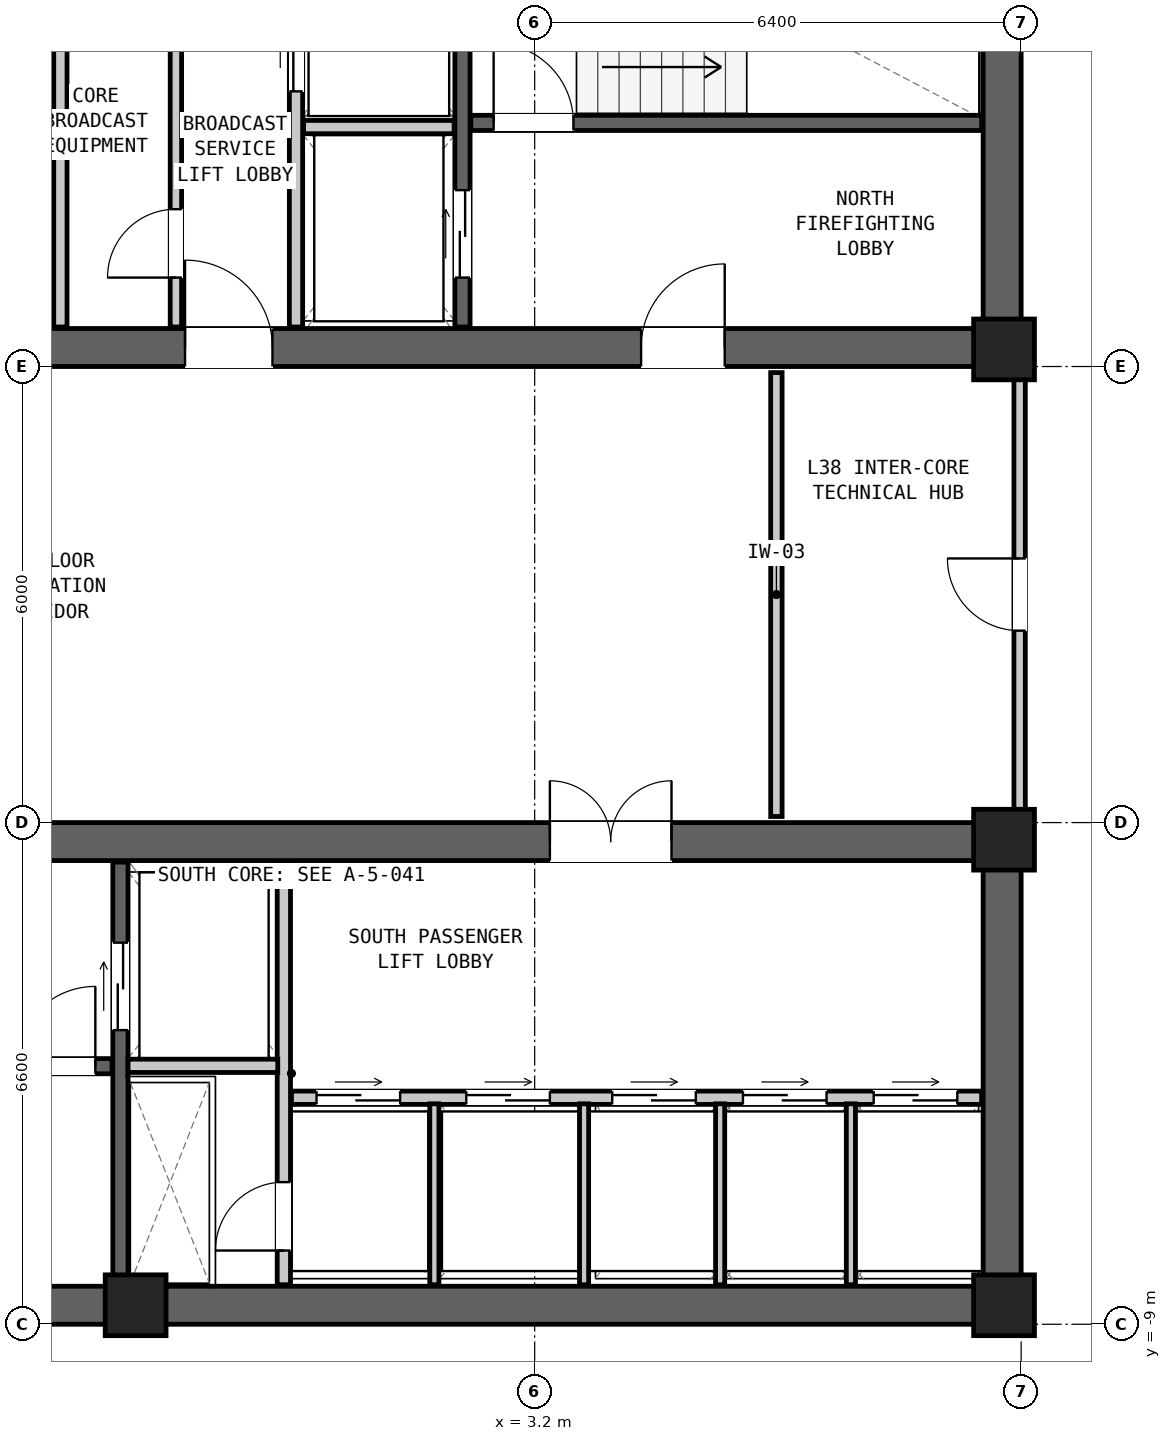
"""IFC4 building model, lengths in metres.
Left out: names, types, materials, properties, quantities, classifications, styles, units other than length and angle.
Written with IfcOpenShell. Run it as: python <this file> out.ifc"""

import sys

from ifc_helpers import new_model, si_unit, direction, frame, frame_2d, origin, origin_2d, place, context, subcontext, project, spatial, rectangle, extrude, element, fill, save


model = new_model("IFC4")
c1 = context("Model", 3, precision=1e-05, world=origin(), true_north=direction((0.0, 1.0)))
c2 = subcontext(c1, "Body", "Model", "MODEL_VIEW")
j1 = project(units=[si_unit("LENGTHUNIT", "METRE"), si_unit("PLANEANGLEUNIT", "RADIAN")], contexts=[c1])
p1 = place(None, origin())
s1 = spatial("IfcSite", under=j1, at=p1, CompositionType="ELEMENT")
p2 = place(p1, origin())
s2 = spatial("IfcBuilding", under=s1, at=p2, CompositionType="ELEMENT")
p3 = place(p2, frame((0.0, 0.0, 131.1)))
s3 = spatial("IfcBuildingStorey", under=s2, at=p3, CompositionType="ELEMENT", Elevation=131.1)
p4 = place(p3, frame((-9.6, 3.85, 0.0), z_axis=(0.0, 0.0, 1.0), x_axis=(1.0, 0.0, 0.0)))
e1 = element("IfcWall", 1, at=p4, inside=s3, PredefinedType="SHEAR", context=c2, shape_type="SweptSolid", body=[
    extrude(rectangle(XDim=19.2, YDim=0.5, at=frame_2d((9.6, 0.0))), origin(), (0.0, 0.0, 1.0), 3.05),
])
p5 = place(p4, frame((14.2, 0.0, 0.0)))
e2 = element("IfcOpeningElement", 2, at=p5, cuts=e1, PredefinedType="OPENING", context=c2, shape_type="SweptSolid", body=[
    extrude(rectangle(XDim=1.1, YDim=2.08, at=frame_2d((0.55, 1.04))), frame((0.0, 0.262, 0.0), z_axis=(0.0, -1.0, 0.0), x_axis=(1.0, 0.0, 0.0)), (0.0, 0.0, 1.0), 0.524),
])
p6 = place(p4, frame((8.2, 0.0, 0.0)))
e3 = element("IfcOpeningElement", 3, at=p6, cuts=e1, PredefinedType="OPENING", context=c2, shape_type="SweptSolid", body=[
    extrude(rectangle(XDim=1.15, YDim=2.1, at=frame_2d((0.575, 1.05))), frame((0.0, 0.262, 0.0), z_axis=(0.0, -1.0, 0.0), x_axis=(1.0, 0.0, 0.0)), (0.0, 0.0, 1.0), 0.524),
])
p7 = place(p4, frame((2.5, 0.0, 0.0)))
e4 = element("IfcOpeningElement", 4, at=p7, cuts=e1, PredefinedType="OPENING", context=c2, shape_type="SweptSolid", body=[
    extrude(rectangle(XDim=1.2, YDim=2.1, at=frame_2d((0.6, 1.05))), frame((0.0, 0.262, 0.0), z_axis=(0.0, -1.0, 0.0), x_axis=(1.0, 0.0, 0.0)), (0.0, 0.0, 1.0), 0.524),
])
p8 = place(p3, frame((9.35, 3.6, 0.0), z_axis=(0.0, 0.0, 1.0), x_axis=(0.0, 1.0, 0.0)))
e5 = element("IfcWall", 5, at=p8, inside=s3, PredefinedType="SHEAR", context=c2, shape_type="SweptSolid", body=[
    extrude(rectangle(XDim=6.6, YDim=0.5, at=frame_2d((3.3, 0.0))), origin(), (0.0, 0.0, 1.0), 3.05),
])
p9 = place(p3, frame((-9.6, -8.75, 0.0), z_axis=(0.0, 0.0, 1.0), x_axis=(1.0, 0.0, 0.0)))
e6 = element("IfcWall", 6, at=p9, inside=s3, PredefinedType="SHEAR", context=c2, shape_type="SweptSolid", body=[
    extrude(rectangle(XDim=19.2, YDim=0.5, at=frame_2d((9.6, 0.0))), origin(), (0.0, 0.0, 1.0), 3.05),
])
p10 = place(p3, frame((-9.6, -2.65, 0.0), z_axis=(0.0, 0.0, 1.0), x_axis=(1.0, 0.0, 0.0)))
e7 = element("IfcWall", 7, at=p10, inside=s3, PredefinedType="SHEAR", context=c2, shape_type="SweptSolid", body=[
    extrude(rectangle(XDim=19.2, YDim=0.5, at=frame_2d((9.6, 0.0))), origin(), (0.0, 0.0, 1.0), 3.05),
])
p11 = place(p10, frame((3.8, 0.0, 0.0)))
e8 = element("IfcOpeningElement", 8, at=p11, cuts=e7, PredefinedType="OPENING", context=c2, shape_type="SweptSolid", body=[
    extrude(rectangle(XDim=1.1, YDim=2.08, at=frame_2d((0.55, 1.04))), frame((0.0, 0.262, 0.0), z_axis=(0.0, -1.0, 0.0), x_axis=(1.0, 0.0, 0.0)), (0.0, 0.0, 1.0), 0.524),
])
p12 = place(p10, frame((13.0, 0.0, 0.0)))
e9 = element("IfcOpeningElement", 9, at=p12, cuts=e7, PredefinedType="OPENING", context=c2, shape_type="SweptSolid", body=[
    extrude(rectangle(XDim=1.6, YDim=2.12, at=frame_2d((0.8, 1.06))), frame((0.0, 0.262, 0.0), z_axis=(0.0, -1.0, 0.0), x_axis=(1.0, 0.0, 0.0)), (0.0, 0.0, 1.0), 0.524),
])
p13 = place(p3, frame((9.35, -9.0, 0.0), z_axis=(0.0, 0.0, 1.0), x_axis=(0.0, 1.0, 0.0)))
e10 = element("IfcWall", 10, at=p13, inside=s3, PredefinedType="SHEAR", context=c2, shape_type="SweptSolid", body=[
    extrude(rectangle(XDim=6.6, YDim=0.5, at=frame_2d((3.3, 0.0))), origin(), (0.0, 0.0, 1.0), 3.05),
])
for number, where, z_axis, x_axis in (
    (11, (9.375, 3.825, 0.0), (0.0, 0.0, 1.0), (1.0, 0.0, 0.0)),
    (12, (9.375, -2.625, 0.0), (0.0, 0.0, 1.0), (1.0, 0.0, 0.0)),
    (13, (-2.05, -8.75, 0.0), (0.0, 0.0, 1.0), (1.0, 0.0, 0.0)),
    (14, (9.375, -8.75, 0.0), (0.0, 0.0, 1.0), (1.0, 0.0, 0.0)),
):
    element("IfcColumn", number, at=place(p3, frame(where, z_axis=z_axis, x_axis=x_axis)), inside=s3, PredefinedType="COLUMN", context=c2, shape_type="SweptSolid", body=[
        extrude(rectangle(XDim=0.8, YDim=0.8, at=origin_2d()), origin(), (0.0, 0.0, 1.0), 3.05),
    ])
p14 = place(p3, frame((2.36, 6.805, 0.0), z_axis=(0.0, 0.0, 1.0), x_axis=(1.0, 0.0, 0.0)))
e15 = element("IfcWall", 15, at=p14, inside=s3, PredefinedType="SHEAR", context=c2, shape_type="SweptSolid", body=[
    extrude(rectangle(XDim=6.72, YDim=0.2, at=frame_2d((3.36, 0.0))), origin(), (0.0, 0.0, 1.0), 2.83),
])
p15 = place(p14, frame((0.3, 0.0, 0.0)))
e16 = element("IfcOpeningElement", 16, at=p15, cuts=e15, PredefinedType="OPENING", context=c2, shape_type="SweptSolid", body=[
    extrude(rectangle(XDim=1.05, YDim=2.08, at=frame_2d((0.525, 1.04))), frame((0.0, 0.112, 0.0), z_axis=(0.0, -1.0, 0.0), x_axis=(1.0, 0.0, 0.0)), (0.0, 0.0, 1.0), 0.224),
])
p16 = place(p3, frame((2.25, 4.12, 0.0), z_axis=(0.0, 0.0, 1.0), x_axis=(0.0, 1.0, 0.0)))
e17 = element("IfcWall", 17, at=p16, inside=s3, PredefinedType="SHEAR", context=c2, shape_type="SweptSolid", body=[
    extrude(rectangle(XDim=5.56, YDim=0.2, at=frame_2d((2.78, 0.0))), origin(), (0.0, 0.0, 1.0), 2.83),
])
p17 = place(p16, frame((0.65, 0.0, 0.0)))
e18 = element("IfcOpeningElement", 18, at=p17, cuts=e17, PredefinedType="OPENING", context=c2, shape_type="SweptSolid", body=[
    extrude(rectangle(XDim=1.15, YDim=2.08, at=frame_2d((0.575, 1.04))), frame((0.0, 0.112, 0.0), z_axis=(0.0, -1.0, 0.0), x_axis=(1.0, 0.0, 0.0)), (0.0, 0.0, 1.0), 0.224),
])
p18 = place(p3, frame((0.06, 4.12, 0.0), z_axis=(0.0, 0.0, 1.0), x_axis=(0.0, 1.0, 0.0)))
e19 = element("IfcWall", 19, at=p18, inside=s3, PredefinedType="PARTITIONING", context=c2, shape_type="SweptSolid", body=[
    extrude(rectangle(XDim=5.56, YDim=0.175, at=frame_2d((2.78, 0.0))), origin(), (0.0, 0.0, 1.0), 2.83),
])
p19 = place(p18, frame((3.1, 0.0, 0.0)))
e20 = element("IfcOpeningElement", 20, at=p19, cuts=e19, PredefinedType="OPENING", context=c2, shape_type="SweptSolid", body=[
    extrude(rectangle(XDim=1.4, YDim=2.12, at=frame_2d((0.7, 1.06))), frame((0.0, 0.1, 0.0), z_axis=(0.0, -1.0, 0.0), x_axis=(1.0, 0.0, 0.0)), (0.0, 0.0, 1.0), 0.199),
])
p20 = place(p3, frame((0.16, 6.75, 0.0), z_axis=(0.0, 0.0, 1.0), x_axis=(1.0, 0.0, 0.0)))
e21 = element("IfcWall", 21, at=p20, inside=s3, PredefinedType="PARTITIONING", context=c2, shape_type="SweptSolid", body=[
    extrude(rectangle(XDim=1.98, YDim=0.175, at=frame_2d((0.99, 0.0))), origin(), (0.0, 0.0, 1.0), 2.83),
])
p21 = place(p3, frame((-3.04, 4.12, 0.0), z_axis=(0.0, 0.0, 1.0), x_axis=(0.0, 1.0, 0.0)))
e22 = element("IfcWall", 22, at=p21, inside=s3, PredefinedType="PARTITIONING", context=c2, shape_type="SweptSolid", body=[
    extrude(rectangle(XDim=5.56, YDim=0.175, at=frame_2d((2.78, 0.0))), origin(), (0.0, 0.0, 1.0), 2.83),
])
p22 = place(p3, frame((-1.52, 4.12, 0.0), z_axis=(0.0, 0.0, 1.0), x_axis=(0.0, 1.0, 0.0)))
e23 = element("IfcWall", 23, at=p22, inside=s3, PredefinedType="PARTITIONING", context=c2, shape_type="SweptSolid", body=[
    extrude(rectangle(XDim=5.56, YDim=0.15, at=frame_2d((2.78, 0.0))), origin(), (0.0, 0.0, 1.0), 2.83),
])
p23 = place(p22, frame((4.38, 0.0, 0.0)))
e24 = element("IfcOpeningElement", 24, at=p23, cuts=e23, PredefinedType="OPENING", context=c2, shape_type="SweptSolid", body=[
    extrude(rectangle(XDim=0.9, YDim=2.05, at=frame_2d((0.45, 1.025))), frame((0.0, 0.087, 0.0), z_axis=(0.0, -1.0, 0.0), x_axis=(1.0, 0.0, 0.0)), (0.0, 0.0, 1.0), 0.174),
])
p24 = place(p22, frame((0.65, 0.0, 0.0)))
e25 = element("IfcOpeningElement", 25, at=p24, cuts=e23, PredefinedType="OPENING", context=c2, shape_type="SweptSolid", body=[
    extrude(rectangle(XDim=0.9, YDim=2.05, at=frame_2d((0.45, 1.025))), frame((0.0, 0.087, 0.0), z_axis=(0.0, -1.0, 0.0), x_axis=(1.0, 0.0, 0.0)), (0.0, 0.0, 1.0), 0.174),
])
p25 = place(p3, frame((-9.08, -5.605, 0.0), z_axis=(0.0, 0.0, 1.0), x_axis=(1.0, 0.0, 0.0)))
e26 = element("IfcWall", 26, at=p25, inside=s3, PredefinedType="SHEAR", context=c2, shape_type="SweptSolid", body=[
    extrude(rectangle(XDim=6.72, YDim=0.2, at=frame_2d((3.36, 0.0))), origin(), (0.0, 0.0, 1.0), 2.83),
])
p26 = place(p25, frame((5.45, 0.0, 0.0)))
e27 = element("IfcOpeningElement", 27, at=p26, cuts=e26, PredefinedType="OPENING", context=c2, shape_type="SweptSolid", body=[
    extrude(rectangle(XDim=1.05, YDim=2.08, at=frame_2d((0.525, 1.04))), frame((0.0, 0.112, 0.0), z_axis=(0.0, -1.0, 0.0), x_axis=(1.0, 0.0, 0.0)), (0.0, 0.0, 1.0), 0.224),
])
p27 = place(p3, frame((-2.25, -8.48, 0.0), z_axis=(0.0, 0.0, 1.0), x_axis=(0.0, 1.0, 0.0)))
e28 = element("IfcWall", 28, at=p27, inside=s3, PredefinedType="SHEAR", context=c2, shape_type="SweptSolid", body=[
    extrude(rectangle(XDim=5.56, YDim=0.2, at=frame_2d((2.78, 0.0))), origin(), (0.0, 0.0, 1.0), 2.83),
])
p28 = place(p27, frame((3.35, 0.0, 0.0)))
e29 = element("IfcOpeningElement", 29, at=p28, cuts=e28, PredefinedType="OPENING", context=c2, shape_type="SweptSolid", body=[
    extrude(rectangle(XDim=1.15, YDim=2.08, at=frame_2d((0.575, 1.04))), frame((0.0, 0.112, 0.0), z_axis=(0.0, -1.0, 0.0), x_axis=(1.0, 0.0, 0.0)), (0.0, 0.0, 1.0), 0.224),
])
p29 = place(p3, frame((-0.1, -8.48, 0.0), z_axis=(0.0, 0.0, 1.0), x_axis=(0.0, 1.0, 0.0)))
e30 = element("IfcWall", 30, at=p29, inside=s3, PredefinedType="PARTITIONING", context=c2, shape_type="SweptSolid", body=[
    extrude(rectangle(XDim=5.56, YDim=0.175, at=frame_2d((2.78, 0.0))), origin(), (0.0, 0.0, 1.0), 2.83),
])
p30 = place(p29, frame((0.45, 0.0, 0.0)))
e31 = element("IfcOpeningElement", 31, at=p30, cuts=e30, PredefinedType="OPENING", context=c2, shape_type="SweptSolid", body=[
    extrude(rectangle(XDim=0.9, YDim=2.05, at=frame_2d((0.45, 1.025))), frame((0.0, 0.1, 0.0), z_axis=(0.0, -1.0, 0.0), x_axis=(1.0, 0.0, 0.0)), (0.0, 0.0, 1.0), 0.199),
])
p31 = place(p3, frame((-2.15, -5.6, 0.0), z_axis=(0.0, 0.0, 1.0), x_axis=(1.0, 0.0, 0.0)))
e32 = element("IfcWall", 32, at=p31, inside=s3, PredefinedType="PARTITIONING", context=c2, shape_type="SweptSolid", body=[
    extrude(rectangle(XDim=1.97, YDim=0.175, at=frame_2d((0.985, 0.0))), origin(), (0.0, 0.0, 1.0), 2.83),
])
p32 = place(p3, frame((0.0, -6.02, 0.0), z_axis=(0.0, 0.0, 1.0), x_axis=(1.0, 0.0, 0.0)))
e33 = element("IfcWall", 33, at=p32, inside=s3, PredefinedType="PARTITIONING", context=c2, shape_type="SweptSolid", body=[
    extrude(rectangle(XDim=9.08, YDim=0.175, at=frame_2d((4.54, 0.0))), origin(), (0.0, 0.0, 1.0), 2.83),
])
p33 = place(p32, frame((0.33, 0.0, 0.0)))
e34 = element("IfcOpeningElement", 34, at=p33, cuts=e33, PredefinedType="OPENING", context=c2, shape_type="SweptSolid", body=[
    extrude(rectangle(XDim=1.1, YDim=2.06, at=frame_2d((0.55, 1.03))), frame((0.0, 0.1, 0.0), z_axis=(0.0, -1.0, 0.0), x_axis=(1.0, 0.0, 0.0)), (0.0, 0.0, 1.0), 0.199),
])
p34 = place(p32, frame((2.3, 0.0, 0.0)))
e35 = element("IfcOpeningElement", 35, at=p34, cuts=e33, PredefinedType="OPENING", context=c2, shape_type="SweptSolid", body=[
    extrude(rectangle(XDim=1.1, YDim=2.06, at=frame_2d((0.55, 1.03))), frame((0.0, 0.1, 0.0), z_axis=(0.0, -1.0, 0.0), x_axis=(1.0, 0.0, 0.0)), (0.0, 0.0, 1.0), 0.199),
])
p35 = place(p32, frame((4.22, 0.0, 0.0)))
e36 = element("IfcOpeningElement", 36, at=p35, cuts=e33, PredefinedType="OPENING", context=c2, shape_type="SweptSolid", body=[
    extrude(rectangle(XDim=1.1, YDim=2.06, at=frame_2d((0.55, 1.03))), frame((0.0, 0.1, 0.0), z_axis=(0.0, -1.0, 0.0), x_axis=(1.0, 0.0, 0.0)), (0.0, 0.0, 1.0), 0.199),
])
p36 = place(p32, frame((5.94, 0.0, 0.0)))
e37 = element("IfcOpeningElement", 37, at=p36, cuts=e33, PredefinedType="OPENING", context=c2, shape_type="SweptSolid", body=[
    extrude(rectangle(XDim=1.1, YDim=2.06, at=frame_2d((0.55, 1.03))), frame((0.0, 0.1, 0.0), z_axis=(0.0, -1.0, 0.0), x_axis=(1.0, 0.0, 0.0)), (0.0, 0.0, 1.0), 0.199),
])
p37 = place(p32, frame((7.66, 0.0, 0.0)))
e38 = element("IfcOpeningElement", 38, at=p37, cuts=e33, PredefinedType="OPENING", context=c2, shape_type="SweptSolid", body=[
    extrude(rectangle(XDim=1.1, YDim=2.06, at=frame_2d((0.55, 1.03))), frame((0.0, 0.1, 0.0), z_axis=(0.0, -1.0, 0.0), x_axis=(1.0, 0.0, 0.0)), (0.0, 0.0, 1.0), 0.199),
])
for number, where, z_axis, x_axis in (
    (39, (1.88, -8.48, 0.0), (0.0, 0.0, 1.0), (0.0, 1.0, 0.0)),
    (40, (3.85, -8.48, 0.0), (0.0, 0.0, 1.0), (0.0, 1.0, 0.0)),
    (41, (5.64, -8.48, 0.0), (0.0, 0.0, 1.0), (0.0, 1.0, 0.0)),
    (42, (7.36, -8.48, 0.0), (0.0, 0.0, 1.0), (0.0, 1.0, 0.0)),
):
    element("IfcWall", number, at=place(p3, frame(where, z_axis=z_axis, x_axis=x_axis)), inside=s3, PredefinedType="PARTITIONING", context=c2, shape_type="SweptSolid", body=[
        extrude(rectangle(XDim=2.38, YDim=0.12, at=frame_2d((1.19, 0.0))), origin(), (0.0, 0.0, 1.0), 2.83),
    ])
p38 = place(p3, frame((6.38, -2.32, 0.0), z_axis=(0.0, 0.0, 1.0), x_axis=(0.0, 1.0, 0.0)))
e43 = element("IfcWall", 43, at=p38, inside=s3, PredefinedType="PARTITIONING", context=c2, shape_type="SweptSolid", body=[
    extrude(rectangle(XDim=5.84, YDim=0.15, at=frame_2d((2.92, 0.0))), origin(), (0.0, 0.0, 1.0), 2.198),
])
p39 = place(p3, frame((9.58, -2.32, 0.0), z_axis=(0.0, 0.0, 1.0), x_axis=(0.0, 1.0, 0.0)))
e44 = element("IfcWall", 44, at=p39, inside=s3, PredefinedType="PARTITIONING", context=c2, shape_type="SweptSolid", body=[
    extrude(rectangle(XDim=5.84, YDim=0.15, at=frame_2d((2.92, 0.0))), origin(), (0.0, 0.0, 1.0), 2.198),
])
p40 = place(p39, frame((2.445, 0.0, 0.0)))
e45 = element("IfcOpeningElement", 45, at=p40, cuts=e44, PredefinedType="OPENING", context=c2, shape_type="SweptSolid", body=[
    extrude(rectangle(XDim=0.95, YDim=2.1, at=frame_2d((0.475, 1.05))), frame((0.0, 0.087, 0.0), z_axis=(0.0, -1.0, 0.0), x_axis=(1.0, 0.0, 0.0)), (0.0, 0.0, 1.0), 0.174),
])
p41 = place(p15, origin())
e46 = element("IfcDoor", 46, at=p41, inside=s3, OperationType="SINGLE_SWING_LEFT", PredefinedType="DOOR", context=c2, shape_type="SweptSolid", body=[
    extrude(rectangle(XDim=1.05, YDim=2.08, at=frame_2d((0.525, 1.04))), frame((0.0, 0.025, 0.0), z_axis=(0.0, -1.0, 0.0), x_axis=(1.0, 0.0, 0.0)), (0.0, 0.0, 1.0), 0.05),
])
fill(e16, e46)
p42 = place(p5, origin())
e47 = element("IfcDoor", 47, at=p42, inside=s3, OperationType="SINGLE_SWING_RIGHT", PredefinedType="DOOR", context=c2, shape_type="SweptSolid", body=[
    extrude(rectangle(XDim=1.1, YDim=2.08, at=frame_2d((0.55, 1.04))), frame((0.0, 0.025, 0.0), z_axis=(0.0, -1.0, 0.0), x_axis=(1.0, 0.0, 0.0)), (0.0, 0.0, 1.0), 0.05),
])
fill(e2, e47)
p43 = place(p17, origin())
e48 = element("IfcDoor", 48, at=p43, inside=s3, OperationType="DOUBLE_DOOR_SLIDING", PredefinedType="DOOR", context=c2, shape_type="SweptSolid", body=[
    extrude(rectangle(XDim=1.15, YDim=2.08, at=frame_2d((0.575, 1.04))), frame((0.0, 0.025, 0.0), z_axis=(0.0, -1.0, 0.0), x_axis=(1.0, 0.0, 0.0)), (0.0, 0.0, 1.0), 0.05),
])
fill(e18, e48)
p44 = place(p19, origin())
e49 = element("IfcDoor", 49, at=p44, inside=s3, OperationType="DOUBLE_DOOR_SLIDING", PredefinedType="DOOR", context=c2, shape_type="SweptSolid", body=[
    extrude(rectangle(XDim=1.4, YDim=2.12, at=frame_2d((0.7, 1.06))), frame((0.0, 0.025, 0.0), z_axis=(0.0, -1.0, 0.0), x_axis=(1.0, 0.0, 0.0)), (0.0, 0.0, 1.0), 0.05),
])
fill(e20, e49)
p45 = place(p6, origin())
e50 = element("IfcDoor", 50, at=p45, inside=s3, OperationType="SINGLE_SWING_LEFT", PredefinedType="DOOR", context=c2, shape_type="SweptSolid", body=[
    extrude(rectangle(XDim=1.15, YDim=2.1, at=frame_2d((0.575, 1.05))), frame((0.0, 0.025, 0.0), z_axis=(0.0, -1.0, 0.0), x_axis=(1.0, 0.0, 0.0)), (0.0, 0.0, 1.0), 0.05),
])
fill(e3, e50)
p46 = place(p24, origin())
e51 = element("IfcDoor", 51, at=p46, inside=s3, OperationType="SINGLE_SWING_LEFT", PredefinedType="DOOR", context=c2, shape_type="SweptSolid", body=[
    extrude(rectangle(XDim=0.9, YDim=2.05, at=frame_2d((0.45, 1.025))), frame((0.0, 0.025, 0.0), z_axis=(0.0, -1.0, 0.0), x_axis=(1.0, 0.0, 0.0)), (0.0, 0.0, 1.0), 0.05),
])
fill(e25, e51)
p47 = place(p26, origin())
e52 = element("IfcDoor", 52, at=p47, inside=s3, OperationType="SINGLE_SWING_RIGHT", PredefinedType="DOOR", context=c2, shape_type="SweptSolid", body=[
    extrude(rectangle(XDim=1.05, YDim=2.08, at=frame_2d((0.525, 1.04))), frame((0.0, 0.025, 0.0), z_axis=(0.0, -1.0, 0.0), x_axis=(1.0, 0.0, 0.0)), (0.0, 0.0, 1.0), 0.05),
])
fill(e27, e52)
p48 = place(p28, origin())
e53 = element("IfcDoor", 53, at=p48, inside=s3, OperationType="DOUBLE_DOOR_SLIDING", PredefinedType="DOOR", context=c2, shape_type="SweptSolid", body=[
    extrude(rectangle(XDim=1.15, YDim=2.08, at=frame_2d((0.575, 1.04))), frame((0.0, 0.025, 0.0), z_axis=(0.0, -1.0, 0.0), x_axis=(1.0, 0.0, 0.0)), (0.0, 0.0, 1.0), 0.05),
])
fill(e29, e53)
p49 = place(p30, origin())
e54 = element("IfcDoor", 54, at=p49, inside=s3, OperationType="SINGLE_SWING_LEFT", PredefinedType="DOOR", context=c2, shape_type="SweptSolid", body=[
    extrude(rectangle(XDim=0.9, YDim=2.05, at=frame_2d((0.45, 1.025))), frame((0.0, 0.025, 0.0), z_axis=(0.0, -1.0, 0.0), x_axis=(1.0, 0.0, 0.0)), (0.0, 0.0, 1.0), 0.05),
])
fill(e31, e54)
p50 = place(p33, origin())
e55 = element("IfcDoor", 55, at=p50, inside=s3, OperationType="DOUBLE_DOOR_SLIDING", PredefinedType="DOOR", context=c2, shape_type="SweptSolid", body=[
    extrude(rectangle(XDim=1.1, YDim=2.06, at=frame_2d((0.55, 1.03))), frame((0.0, 0.025, 0.0), z_axis=(0.0, -1.0, 0.0), x_axis=(1.0, 0.0, 0.0)), (0.0, 0.0, 1.0), 0.05),
])
fill(e34, e55)
p51 = place(p34, origin())
e56 = element("IfcDoor", 56, at=p51, inside=s3, OperationType="DOUBLE_DOOR_SLIDING", PredefinedType="DOOR", context=c2, shape_type="SweptSolid", body=[
    extrude(rectangle(XDim=1.1, YDim=2.06, at=frame_2d((0.55, 1.03))), frame((0.0, 0.025, 0.0), z_axis=(0.0, -1.0, 0.0), x_axis=(1.0, 0.0, 0.0)), (0.0, 0.0, 1.0), 0.05),
])
fill(e35, e56)
p52 = place(p12, origin())
e57 = element("IfcDoor", 57, at=p52, inside=s3, OperationType="DOUBLE_DOOR_SINGLE_SWING", PredefinedType="DOOR", context=c2, shape_type="SweptSolid", body=[
    extrude(rectangle(XDim=1.6, YDim=2.12, at=frame_2d((0.8, 1.06))), frame((0.0, 0.025, 0.0), z_axis=(0.0, -1.0, 0.0), x_axis=(1.0, 0.0, 0.0)), (0.0, 0.0, 1.0), 0.05),
])
fill(e9, e57)
p53 = place(p40, origin())
e58 = element("IfcDoor", 58, at=p53, inside=s3, OperationType="SINGLE_SWING_RIGHT", PredefinedType="DOOR", context=c2, shape_type="SweptSolid", body=[
    extrude(rectangle(XDim=0.95, YDim=2.1, at=frame_2d((0.475, 1.05))), frame((0.0, 0.025, 0.0), z_axis=(0.0, -1.0, 0.0), x_axis=(1.0, 0.0, 0.0)), (0.0, 0.0, 1.0), 0.05),
])
fill(e45, e58)
p54 = place(p35, origin())
e59 = element("IfcDoor", 59, at=p54, inside=s3, OperationType="DOUBLE_DOOR_SLIDING", PredefinedType="DOOR", context=c2, shape_type="SweptSolid", body=[
    extrude(rectangle(XDim=1.1, YDim=2.06, at=frame_2d((0.55, 1.03))), frame((0.0, 0.025, 0.0), z_axis=(0.0, -1.0, 0.0), x_axis=(1.0, 0.0, 0.0)), (0.0, 0.0, 1.0), 0.05),
])
fill(e36, e59)
p55 = place(p36, origin())
e60 = element("IfcDoor", 60, at=p55, inside=s3, OperationType="DOUBLE_DOOR_SLIDING", PredefinedType="DOOR", context=c2, shape_type="SweptSolid", body=[
    extrude(rectangle(XDim=1.1, YDim=2.06, at=frame_2d((0.55, 1.03))), frame((0.0, 0.025, 0.0), z_axis=(0.0, -1.0, 0.0), x_axis=(1.0, 0.0, 0.0)), (0.0, 0.0, 1.0), 0.05),
])
fill(e37, e60)
p56 = place(p37, origin())
e61 = element("IfcDoor", 61, at=p56, inside=s3, OperationType="DOUBLE_DOOR_SLIDING", PredefinedType="DOOR", context=c2, shape_type="SweptSolid", body=[
    extrude(rectangle(XDim=1.1, YDim=2.06, at=frame_2d((0.55, 1.03))), frame((0.0, 0.025, 0.0), z_axis=(0.0, -1.0, 0.0), x_axis=(1.0, 0.0, 0.0)), (0.0, 0.0, 1.0), 0.05),
])
fill(e38, e61)
save(model, sys.argv[1])
